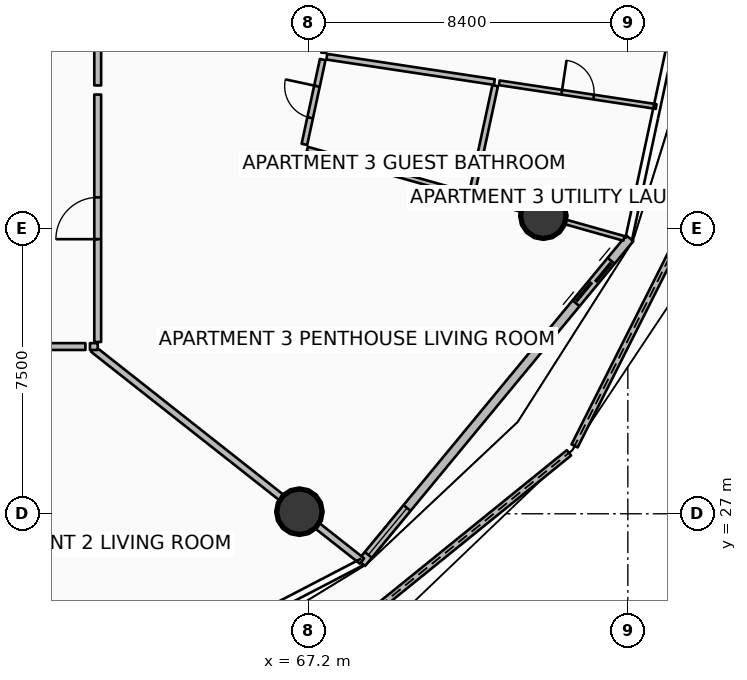
"""IFC4 building model, lengths in metres.
Left out: names, types, materials, properties, quantities, classifications, styles, units other than length and angle.
Written with IfcOpenShell. Run it as: python <this file> out.ifc"""

import sys

from ifc_helpers import new_model, si_unit, direction, frame, frame_2d, origin, origin_2d, place, context, subcontext, project, spatial, polyline, rectangle, circle, outline, extrude, element, fill, save


model = new_model("IFC4")
c1 = context("Model", 3, precision=1e-05, world=origin(), true_north=direction((0.0, 1.0)))
c2 = subcontext(c1, "Body", "Model", "MODEL_VIEW")
j1 = project(units=[si_unit("LENGTHUNIT", "METRE"), si_unit("PLANEANGLEUNIT", "RADIAN")], contexts=[c1])
p1 = place(None, origin())
s1 = spatial("IfcSite", under=j1, at=p1, CompositionType="ELEMENT")
p2 = place(p1, origin())
s2 = spatial("IfcBuilding", under=s1, at=p2, CompositionType="ELEMENT")
p3 = place(p2, frame((0.0, 0.0, 108.9)))
s3 = spatial("IfcBuildingStorey", under=s2, at=p3, CompositionType="ELEMENT", Elevation=108.9)
for number, where, z_axis, x_axis in (
    (1, (66.958, 27.055, 0.0), (0.0, 0.0, 1.0), (1.0, 0.0, 0.0)),
    (2, (73.377, 34.843, 0.0), (0.0, 0.0, 1.0), (1.0, 0.0, 0.0)),
):
    element("IfcColumn", number, at=place(p3, frame(where, z_axis=z_axis, x_axis=x_axis)), inside=s3, PredefinedType="COLUMN", context=c2, shape_type="SweptSolid", body=[
        extrude(circle(Radius=0.6, at=origin_2d()), origin(), (0.0, 0.0, 1.0), 3.5),
    ])
p4 = place(p3, frame((65.541, 21.715, 0.0), z_axis=(0.0, 0.0, 1.0), x_axis=(0.777242274281, 0.629201436005, 0.0)))
e3 = element("IfcWall", 3, at=p4, inside=s3, PredefinedType="PARAPET", context=c2, shape_type="SweptSolid", body=[
    extrude(outline(polyline([(0.0, 0.0), (10.949, 0.0), (10.949, 1.148), (5.474, 1.127), (0.0, 1.224), (0.0, 0.0)])), frame((0.0, 0.09, 0.0), z_axis=(0.0, -1.0, 0.0), x_axis=(1.0, 0.0, 0.0)), (0.0, 0.0, 1.0), 0.18),
])
p5 = place(p3, frame((74.198, 28.786, 0.0), z_axis=(0.0, 0.0, 1.0), x_axis=(0.450016241305, 0.893020370743, 0.0)))
e4 = element("IfcWall", 4, at=p5, inside=s3, PredefinedType="PARAPET", context=c2, shape_type="SweptSolid", body=[
    extrude(outline(polyline([(0.0, 0.0), (11.803, 0.0), (11.803, 1.483), (5.902, 1.284), (0.0, 1.148), (0.0, 0.0)])), frame((0.0, 0.09, 0.0), z_axis=(0.0, -1.0, 0.0), x_axis=(1.0, 0.0, 0.0)), (0.0, 0.0, 1.0), 0.18),
])
p6 = place(p3, frame((68.593, 25.702, 0.0), z_axis=(0.0, 0.0, 1.0), x_axis=(0.636704975, 0.771107498868, 0.0)))
e5 = element("IfcWall", 5, at=p6, inside=s3, PredefinedType="SOLIDWALL", context=c2, shape_type="SweptSolid", body=[
    extrude(rectangle(XDim=11.084, YDim=0.24, at=frame_2d((5.542, 0.0))), origin(), (0.0, 0.0, 1.0), 2.45),
])
p7 = place(p6, frame((8.864, 0.0, 0.0)))
e6 = element("IfcOpeningElement", 6, at=p7, cuts=e5, PredefinedType="OPENING", context=c2, shape_type="SweptSolid", body=[
    extrude(rectangle(XDim=1.45, YDim=2.15, at=frame_2d((0.725, 1.075))), frame((0.0, 0.13, 0.0), z_axis=(0.0, -1.0, 0.0), x_axis=(1.0, 0.0, 0.0)), (0.0, 0.0, 1.0), 0.26),
])
p8 = place(p6, frame((0.28, 0.0, 0.65)))
e7 = element("IfcOpeningElement", 7, at=p8, cuts=e5, PredefinedType="OPENING", context=c2, shape_type="SweptSolid", body=[
    extrude(rectangle(XDim=1.6, YDim=1.5, at=frame_2d((0.8, 0.75))), frame((0.0, 0.13, 0.0), z_axis=(0.0, -1.0, 0.0), x_axis=(1.0, 0.0, 0.0)), (0.0, 0.0, 1.0), 0.26),
])
p9 = place(p3, frame((61.532, 31.332, 0.0), z_axis=(0.0, 0.0, 1.0), x_axis=(0.785307944478, -0.619105348337, 0.0)))
e8 = element("IfcWall", 8, at=p9, inside=s3, PredefinedType="PARTITIONING", context=c2, shape_type="SweptSolid", body=[
    extrude(rectangle(XDim=9.006, YDim=0.18, at=frame_2d((4.503, 0.0))), origin(), (0.0, 0.0, 1.0), 2.94),
])
p10 = place(p3, frame((54.056, 31.4, 0.0), z_axis=(0.0, 0.0, 1.0), x_axis=(1.0, 0.0, 0.0)))
e9 = element("IfcWall", 9, at=p10, inside=s3, PredefinedType="PARTITIONING", context=c2, shape_type="SweptSolid", body=[
    extrude(rectangle(XDim=7.27, YDim=0.18, at=frame_2d((3.635, 0.0))), origin(), (0.0, 0.0, 1.0), 2.94),
])
p11 = place(p10, frame((3.085, 0.0, 0.0)))
e10 = element("IfcOpeningElement", 10, at=p11, cuts=e9, PredefinedType="OPENING", context=c2, shape_type="SweptSolid", body=[
    extrude(rectangle(XDim=1.1, YDim=2.1, at=frame_2d((0.55, 1.05))), frame((0.0, 0.1, 0.0), z_axis=(0.0, -1.0, 0.0), x_axis=(1.0, 0.0, 0.0)), (0.0, 0.0, 1.0), 0.2),
])
p12 = place(p3, frame((61.446, 31.4, 0.0), z_axis=(0.0, 0.0, 1.0), x_axis=(1.0, 0.0, 0.0)))
e11 = element("IfcWall", 11, at=p12, inside=s3, PredefinedType="PARTITIONING", context=c2, shape_type="SweptSolid", body=[
    extrude(rectangle(XDim=0.204, YDim=0.18, at=frame_2d((0.102, 0.0))), origin(), (0.0, 0.0, 1.0), 2.94),
])
p13 = place(p3, frame((61.65, 31.52, 0.0), z_axis=(0.0, 0.0, 1.0), x_axis=(0.0, 1.0, 0.0)))
e12 = element("IfcWall", 12, at=p13, inside=s3, PredefinedType="PARTITIONING", context=c2, shape_type="SweptSolid", body=[
    extrude(rectangle(XDim=6.51, YDim=0.18, at=frame_2d((3.255, 0.0))), origin(), (0.0, 0.0, 1.0), 2.94),
])
p14 = place(p13, frame((2.705, 0.0, 0.0)))
e13 = element("IfcOpeningElement", 13, at=p14, cuts=e12, PredefinedType="OPENING", context=c2, shape_type="SweptSolid", body=[
    extrude(rectangle(XDim=1.1, YDim=2.1, at=frame_2d((0.55, 1.05))), frame((0.0, 0.1, 0.0), z_axis=(0.0, -1.0, 0.0), x_axis=(1.0, 0.0, 0.0)), (0.0, 0.0, 1.0), 0.2),
])
p15 = place(p3, frame((61.65, 38.27, 0.0), z_axis=(0.0, 0.0, 1.0), x_axis=(0.0, 1.0, 0.0)))
e14 = element("IfcWall", 14, at=p15, inside=s3, PredefinedType="PARTITIONING", context=c2, shape_type="SweptSolid", body=[
    extrude(rectangle(XDim=5.225, YDim=0.18, at=frame_2d((2.613, 0.0))), origin(), (0.0, 0.0, 1.0), 2.94),
])
p16 = place(p3, frame((67.164, 36.595, 0.0), z_axis=(0.0, 0.0, 1.0), x_axis=(0.962450431501, -0.271457486363, 0.0)))
e15 = element("IfcWall", 15, at=p16, inside=s3, PredefinedType="PARTITIONING", context=c2, shape_type="SweptSolid", body=[
    extrude(rectangle(XDim=8.659, YDim=0.125, at=frame_2d((4.33, 0.0))), origin(), (0.0, 0.0, 1.0), 2.94),
])
p17 = place(p3, frame((67.089, 36.72, 0.0), z_axis=(0.0, 0.0, 1.0), x_axis=(0.210821839733, 0.977524501939, 0.0)))
e16 = element("IfcWall", 16, at=p17, inside=s3, PredefinedType="PARTITIONING", context=c2, shape_type="SweptSolid", body=[
    extrude(rectangle(XDim=2.282, YDim=0.15, at=frame_2d((1.141, 0.0))), origin(), (0.0, 0.0, 1.0), 2.94),
])
p18 = place(p17, frame((0.716, 0.0, 0.0)))
e17 = element("IfcOpeningElement", 17, at=p18, cuts=e16, PredefinedType="OPENING", context=c2, shape_type="SweptSolid", body=[
    extrude(rectangle(XDim=0.85, YDim=2.06, at=frame_2d((0.425, 1.03))), frame((0.0, 0.085, 0.0), z_axis=(0.0, -1.0, 0.0), x_axis=(1.0, 0.0, 0.0)), (0.0, 0.0, 1.0), 0.17),
])
p19 = place(p3, frame((71.507, 35.474, 0.0), z_axis=(0.0, 0.0, 1.0), x_axis=(0.210860301297, 0.977516206176, 0.0)))
e18 = element("IfcWall", 18, at=p19, inside=s3, PredefinedType="PARTITIONING", context=c2, shape_type="SweptSolid", body=[
    extrude(rectangle(XDim=2.855, YDim=0.15, at=frame_2d((1.428, 0.0))), origin(), (0.0, 0.0, 1.0), 2.94),
])
p20 = place(p3, frame((67.678, 39.026, 0.0), z_axis=(0.0, 0.0, 1.0), x_axis=(0.988770717544, -0.149440517018, 0.0)))
e19 = element("IfcWall", 19, at=p20, inside=s3, PredefinedType="PARTITIONING", context=c2, shape_type="SweptSolid", body=[
    extrude(rectangle(XDim=4.46, YDim=0.15, at=frame_2d((2.23, 0.0))), origin(), (0.0, 0.0, 1.0), 2.94),
])
p21 = place(p3, frame((72.217, 38.34, 0.0), z_axis=(0.0, 0.0, 1.0), x_axis=(0.988773178852, -0.149424230908, 0.0)))
e20 = element("IfcWall", 20, at=p21, inside=s3, PredefinedType="PARTITIONING", context=c2, shape_type="SweptSolid", body=[
    extrude(rectangle(XDim=4.175, YDim=0.125, at=frame_2d((2.087, 0.0))), origin(), (0.0, 0.0, 1.0), 2.94),
])
p22 = place(p21, frame((1.662, 0.0, 0.0)))
e21 = element("IfcOpeningElement", 21, at=p22, cuts=e20, PredefinedType="OPENING", context=c2, shape_type="SweptSolid", body=[
    extrude(rectangle(XDim=0.85, YDim=2.06, at=frame_2d((0.425, 1.03))), frame((0.0, 0.073, 0.0), z_axis=(0.0, -1.0, 0.0), x_axis=(1.0, 0.0, 0.0)), (0.0, 0.0, 1.0), 0.145),
])
p23 = place(p3, frame((67.596, 39.129, 0.0), z_axis=(0.0, 0.0, 1.0), x_axis=(0.073546842806, 0.997291763685, 0.0)))
e22 = element("IfcWall", 22, at=p23, inside=s3, PredefinedType="PARTITIONING", context=c2, shape_type="SweptSolid", body=[
    extrude(rectangle(XDim=2.852, YDim=0.125, at=frame_2d((1.426, 0.0))), origin(), (0.0, 0.0, 1.0), 2.94),
])
p24 = place(p23, frame((1.001, 0.0, 0.0)))
e23 = element("IfcOpeningElement", 23, at=p24, cuts=e22, PredefinedType="OPENING", context=c2, shape_type="SweptSolid", body=[
    extrude(rectangle(XDim=0.85, YDim=2.06, at=frame_2d((0.425, 1.03))), frame((0.0, 0.073, 0.0), z_axis=(0.0, -1.0, 0.0), x_axis=(1.0, 0.0, 0.0)), (0.0, 0.0, 1.0), 0.145),
])
p25 = place(p7, origin())
e24 = element("IfcDoor", 24, at=p25, inside=s3, OperationType="DOUBLE_DOOR_SLIDING", PredefinedType="DOOR", context=c2, shape_type="SweptSolid", body=[
    extrude(rectangle(XDim=1.45, YDim=2.15, at=frame_2d((0.725, 1.075))), frame((0.0, 0.025, 0.0), z_axis=(0.0, -1.0, 0.0), x_axis=(1.0, 0.0, 0.0)), (0.0, 0.0, 1.0), 0.05),
])
fill(e6, e24)
p26 = place(p8, origin())
e25 = element("IfcWindow", 25, at=p26, inside=s3, PartitioningType="SINGLE_PANEL", PredefinedType="WINDOW", context=c2, shape_type="SweptSolid", body=[
    extrude(rectangle(XDim=1.6, YDim=1.5, at=frame_2d((0.8, 0.75))), frame((0.0, 0.03, 0.0), z_axis=(0.0, -1.0, 0.0), x_axis=(1.0, 0.0, 0.0)), (0.0, 0.0, 1.0), 0.06),
])
fill(e7, e25)
p27 = place(p14, origin())
e26 = element("IfcDoor", 26, at=p27, inside=s3, OperationType="SINGLE_SWING_LEFT", PredefinedType="DOOR", context=c2, shape_type="SweptSolid", body=[
    extrude(rectangle(XDim=1.1, YDim=2.1, at=frame_2d((0.55, 1.05))), frame((0.0, 0.025, 0.0), z_axis=(0.0, -1.0, 0.0), x_axis=(1.0, 0.0, 0.0)), (0.0, 0.0, 1.0), 0.05),
])
fill(e13, e26)
p28 = place(p18, origin())
e27 = element("IfcDoor", 27, at=p28, inside=s3, OperationType="SINGLE_SWING_RIGHT", PredefinedType="DOOR", context=c2, shape_type="SweptSolid", body=[
    extrude(rectangle(XDim=0.85, YDim=2.06, at=frame_2d((0.425, 1.03))), frame((0.0, 0.025, 0.0), z_axis=(0.0, -1.0, 0.0), x_axis=(1.0, 0.0, 0.0)), (0.0, 0.0, 1.0), 0.05),
])
fill(e17, e27)
p29 = place(p22, origin())
e28 = element("IfcDoor", 28, at=p29, inside=s3, OperationType="SINGLE_SWING_LEFT", PredefinedType="DOOR", context=c2, shape_type="SweptSolid", body=[
    extrude(rectangle(XDim=0.85, YDim=2.06, at=frame_2d((0.425, 1.03))), frame((0.0, 0.025, 0.0), z_axis=(0.0, -1.0, 0.0), x_axis=(1.0, 0.0, 0.0)), (0.0, 0.0, 1.0), 0.05),
])
fill(e21, e28)
save(model, sys.argv[1])
